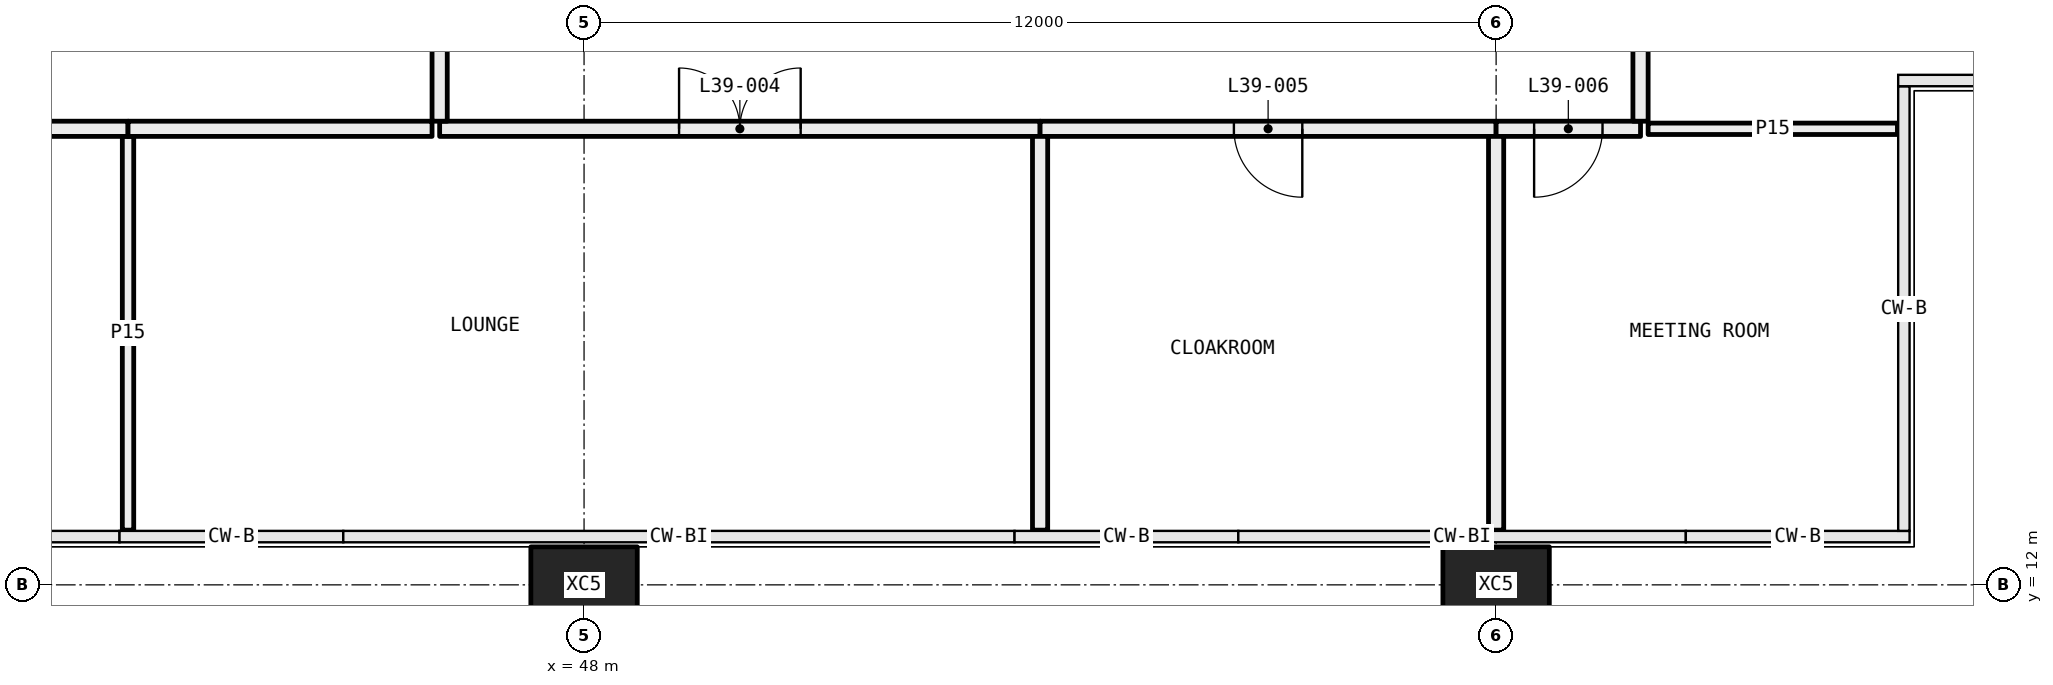
"""IFC4 building model, lengths in metres.
Left out: names, types, materials, properties, quantities, classifications, styles, units other than length and angle.
Written with IfcOpenShell. Run it as: python <this file> out.ifc"""

import sys

from ifc_helpers import new_model, si_unit, direction, frame, frame_2d, origin, origin_2d, place, context, subcontext, project, spatial, rectangle, hollow_rectangle, extrude, element, fill, save


model = new_model("IFC4")
c1 = context("Model", 3, precision=1e-05, world=origin(), true_north=direction((0.0, 1.0)))
c2 = subcontext(c1, "Body", "Model", "MODEL_VIEW")
j1 = project(units=[si_unit("LENGTHUNIT", "METRE"), si_unit("PLANEANGLEUNIT", "RADIAN")], contexts=[c1])
p1 = place(None, origin())
s1 = spatial("IfcSite", under=j1, at=p1, CompositionType="ELEMENT")
p2 = place(p1, origin())
s2 = spatial("IfcBuilding", under=s1, at=p2, CompositionType="ELEMENT")
p3 = place(p2, frame((0.0, 0.0, 148.35)))
s3 = spatial("IfcBuildingStorey", under=s2, at=p3, CompositionType="ELEMENT", Elevation=148.35)
for number, where, z_axis, x_axis in (
    (1, (48.0, 12.0, -0.4), (0.0, 0.0, 1.0), (1.0, 0.0, 0.0)),
    (2, (60.0, 12.0, -0.4), (0.0, 0.0, 1.0), (1.0, 0.0, 0.0)),
):
    element("IfcColumn", number, at=place(p3, frame(where, z_axis=z_axis, x_axis=x_axis)), inside=s3, PredefinedType="COLUMN", context=c2, shape_type="SweptSolid", body=[
        extrude(hollow_rectangle(XDim=1.4, YDim=1.0, WallThickness=0.055, at=origin_2d()), origin(), (0.0, 0.0, 1.0), 5.4),
    ])
p4 = place(p3, frame((46.1, 18.0, 0.0), z_axis=(0.0, 0.0, 1.0), x_axis=(1.0, 0.0, 0.0)))
e3 = element("IfcWall", 3, at=p4, inside=s3, PredefinedType="PARTITIONING", context=c2, shape_type="SweptSolid", body=[
    extrude(rectangle(XDim=7.9, YDim=0.2, at=frame_2d((3.95, 0.0))), origin(), (0.0, 0.0, 1.0), 5.0),
])
p5 = place(p4, frame((3.15, 0.0, 0.0)))
e4 = element("IfcOpeningElement", 4, at=p5, cuts=e3, PredefinedType="OPENING", context=c2, shape_type="SweptSolid", body=[
    extrude(rectangle(XDim=1.6, YDim=2.1, at=frame_2d((0.8, 1.05))), frame((0.0, 0.11, 0.0), z_axis=(0.0, -1.0, 0.0), x_axis=(1.0, 0.0, 0.0)), (0.0, 0.0, 1.0), 0.22),
])
p6 = place(p3, frame((54.0, 18.0, 0.0), z_axis=(0.0, 0.0, 1.0), x_axis=(1.0, 0.0, 0.0)))
e5 = element("IfcWall", 5, at=p6, inside=s3, PredefinedType="PARTITIONING", context=c2, shape_type="SweptSolid", body=[
    extrude(rectangle(XDim=6.0, YDim=0.2, at=frame_2d((3.0, 0.0))), origin(), (0.0, 0.0, 1.0), 5.0),
])
p7 = place(p6, frame((2.55, 0.0, 0.0)))
e6 = element("IfcOpeningElement", 6, at=p7, cuts=e5, PredefinedType="OPENING", context=c2, shape_type="SweptSolid", body=[
    extrude(rectangle(XDim=0.9, YDim=2.1, at=frame_2d((0.45, 1.05))), frame((0.0, 0.11, 0.0), z_axis=(0.0, -1.0, 0.0), x_axis=(1.0, 0.0, 0.0)), (0.0, 0.0, 1.0), 0.22),
])
p8 = place(p3, frame((60.0, 18.0, 0.0), z_axis=(0.0, 0.0, 1.0), x_axis=(1.0, 0.0, 0.0)))
e7 = element("IfcWall", 7, at=p8, inside=s3, PredefinedType="PARTITIONING", context=c2, shape_type="SweptSolid", body=[
    extrude(rectangle(XDim=1.9, YDim=0.2, at=frame_2d((0.95, 0.0))), origin(), (0.0, 0.0, 1.0), 5.0),
])
p9 = place(p8, frame((0.5, 0.0, 0.0)))
e8 = element("IfcOpeningElement", 8, at=p9, cuts=e7, PredefinedType="OPENING", context=c2, shape_type="SweptSolid", body=[
    extrude(rectangle(XDim=0.9, YDim=2.1, at=frame_2d((0.45, 1.05))), frame((0.0, 0.11, 0.0), z_axis=(0.0, -1.0, 0.0), x_axis=(1.0, 0.0, 0.0)), (0.0, 0.0, 1.0), 0.22),
])
p10 = place(p3, frame((61.9, 18.1, 0.0), z_axis=(0.0, 0.0, 1.0), x_axis=(0.0, 1.0, 0.0)))
e9 = element("IfcWall", 9, at=p10, inside=s3, PredefinedType="PARTITIONING", context=c2, shape_type="SweptSolid", body=[
    extrude(rectangle(XDim=17.9, YDim=0.2, at=frame_2d((8.95, 0.0))), origin(), (0.0, 0.0, 1.0), 4.4),
])
p11 = place(p10, frame((8.15, 0.0, 0.0)))
e10 = element("IfcOpeningElement", 10, at=p11, cuts=e9, PredefinedType="OPENING", context=c2, shape_type="SweptSolid", body=[
    extrude(rectangle(XDim=1.6, YDim=2.1, at=frame_2d((0.8, 1.05))), frame((0.0, 0.11, 0.0), z_axis=(0.0, -1.0, 0.0), x_axis=(1.0, 0.0, 0.0)), (0.0, 0.0, 1.0), 0.22),
])
p12 = place(p3, frame((46.1, 23.9, 0.0), z_axis=(0.0, 0.0, 1.0), x_axis=(0.0, -1.0, 0.0)))
e11 = element("IfcWall", 11, at=p12, inside=s3, PredefinedType="PARTITIONING", context=c2, shape_type="SweptSolid", body=[
    extrude(rectangle(XDim=5.8, YDim=0.2, at=frame_2d((2.9, 0.0))), origin(), (0.0, 0.0, 1.0), 5.0),
])
p13 = place(p3, frame((42.0, 12.72, 0.0), z_axis=(0.0, 0.0, 1.0), x_axis=(0.0, 1.0, 0.0)))
e12 = element("IfcWall", 12, at=p13, inside=s3, PredefinedType="PARTITIONING", context=c2, shape_type="SweptSolid", body=[
    extrude(rectangle(XDim=5.18, YDim=0.15, at=frame_2d((2.59, 0.0))), origin(), (0.0, 0.0, 1.0), 5.0),
])
p14 = place(p3, frame((42.0, 18.0, 0.0), z_axis=(0.0, 0.0, 1.0), x_axis=(-1.0, 0.0, 0.0)))
e13 = element("IfcWall", 13, at=p14, inside=s3, PredefinedType="PARTITIONING", context=c2, shape_type="SweptSolid", body=[
    extrude(rectangle(XDim=6.0, YDim=0.2, at=frame_2d((3.0, 0.0))), origin(), (0.0, 0.0, 1.0), 4.4),
])
p15 = place(p3, frame((54.0, 12.72, 0.0), z_axis=(0.0, 0.0, 1.0), x_axis=(0.0, 1.0, 0.0)))
e14 = element("IfcWall", 14, at=p15, inside=s3, PredefinedType="PARTITIONING", context=c2, shape_type="SweptSolid", body=[
    extrude(rectangle(XDim=5.18, YDim=0.2, at=frame_2d((2.59, 0.0))), origin(), (0.0, 0.0, 1.0), 5.0),
])
p16 = place(p3, frame((46.0, 18.0, 0.0), z_axis=(0.0, 0.0, 1.0), x_axis=(-1.0, 0.0, 0.0)))
e15 = element("IfcWall", 15, at=p16, inside=s3, PredefinedType="PARTITIONING", context=c2, shape_type="SweptSolid", body=[
    extrude(rectangle(XDim=4.0, YDim=0.2, at=frame_2d((2.0, 0.0))), origin(), (0.0, 0.0, 1.0), 5.0),
])
p17 = place(p3, frame((60.0, 12.72, 0.0), z_axis=(0.0, 0.0, 1.0), x_axis=(0.0, 1.0, 0.0)))
e16 = element("IfcWall", 16, at=p17, inside=s3, PredefinedType="PARTITIONING", context=c2, shape_type="SweptSolid", body=[
    extrude(rectangle(XDim=5.18, YDim=0.2, at=frame_2d((2.59, 0.0))), origin(), (0.0, 0.0, 1.0), 5.0),
])
p18 = place(p3, frame((65.28, 18.0, 0.0), z_axis=(0.0, 0.0, 1.0), x_axis=(-1.0, 0.0, 0.0)))
e17 = element("IfcWall", 17, at=p18, inside=s3, PredefinedType="PARTITIONING", context=c2, shape_type="SweptSolid", body=[
    extrude(rectangle(XDim=3.28, YDim=0.15, at=frame_2d((1.64, 0.0))), origin(), (0.0, 0.0, 1.0), 5.0),
])
p19 = place(p5, origin())
e18 = element("IfcDoor", 18, at=p19, inside=s3, OperationType="DOUBLE_DOOR_SINGLE_SWING", PredefinedType="DOOR", context=c2, shape_type="SweptSolid", body=[
    extrude(rectangle(XDim=1.6, YDim=2.1, at=frame_2d((0.8, 1.05))), frame((0.0, 0.025, 0.0), z_axis=(0.0, -1.0, 0.0), x_axis=(1.0, 0.0, 0.0)), (0.0, 0.0, 1.0), 0.05),
])
fill(e4, e18)
p20 = place(p7, frame((0.9, 0.0, 0.0), x_axis=(-1.0, 0.0, 0.0)))
e19 = element("IfcDoor", 19, at=p20, inside=s3, OperationType="SINGLE_SWING_RIGHT", PredefinedType="DOOR", context=c2, shape_type="SweptSolid", body=[
    extrude(rectangle(XDim=0.9, YDim=2.1, at=frame_2d((0.45, 1.05))), frame((0.0, 0.025, 0.0), z_axis=(0.0, -1.0, 0.0), x_axis=(1.0, 0.0, 0.0)), (0.0, 0.0, 1.0), 0.05),
])
fill(e6, e19)
p21 = place(p9, frame((0.9, 0.0, 0.0), x_axis=(-1.0, 0.0, 0.0)))
e20 = element("IfcDoor", 20, at=p21, inside=s3, OperationType="SINGLE_SWING_LEFT", PredefinedType="DOOR", context=c2, shape_type="SweptSolid", body=[
    extrude(rectangle(XDim=0.9, YDim=2.1, at=frame_2d((0.45, 1.05))), frame((0.0, 0.025, 0.0), z_axis=(0.0, -1.0, 0.0), x_axis=(1.0, 0.0, 0.0)), (0.0, 0.0, 1.0), 0.05),
])
fill(e8, e20)
save(model, sys.argv[1])
